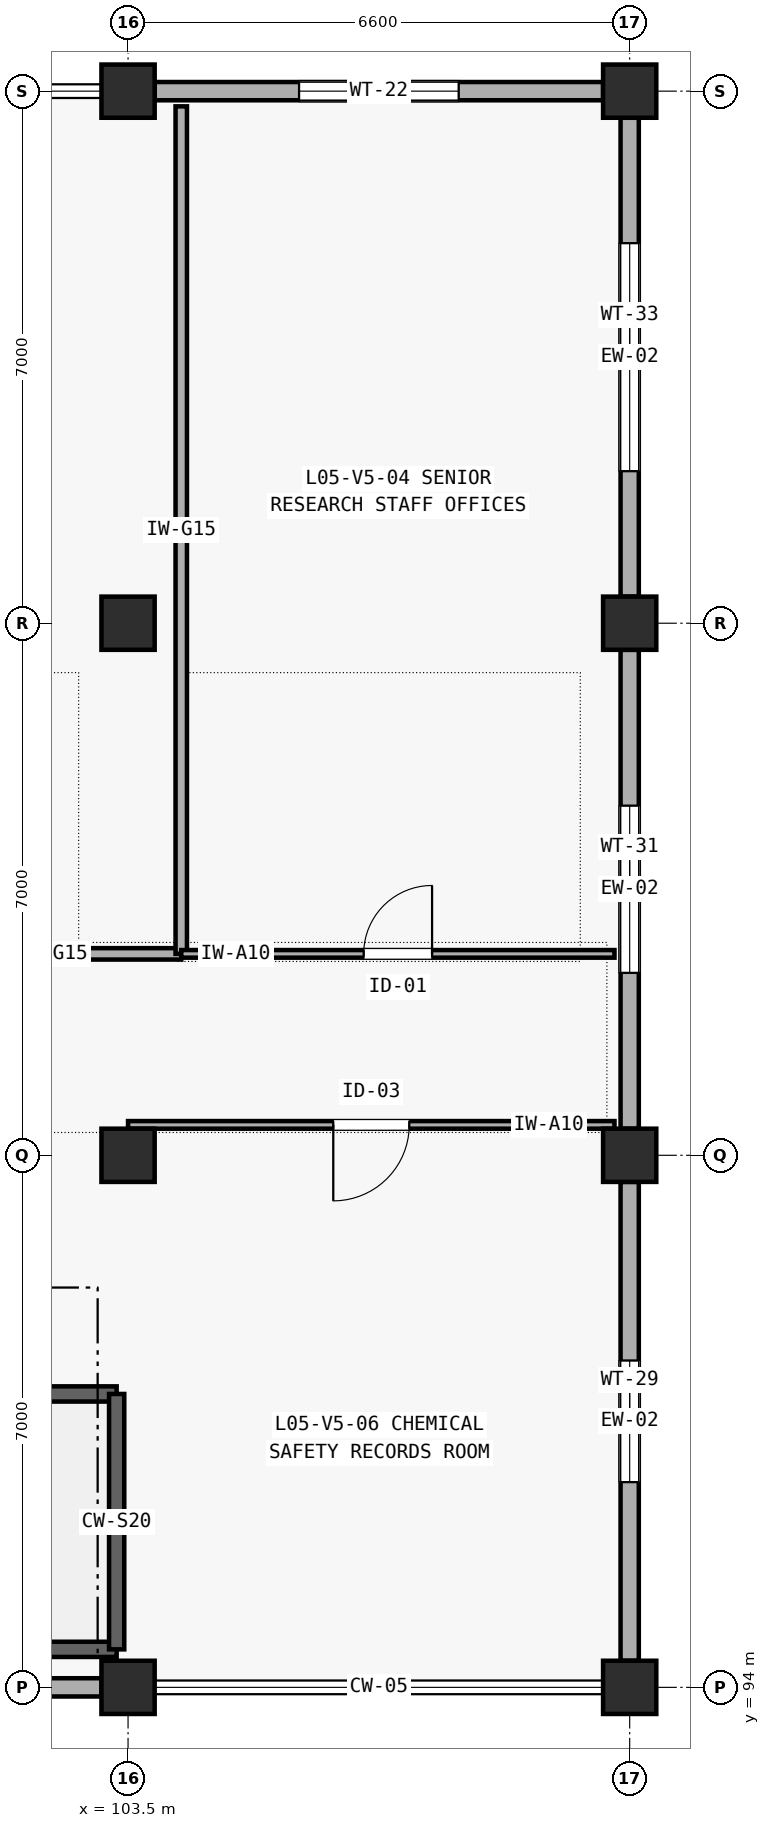
"""IFC4 building model, lengths in metres.
Left out: names, types, materials, properties, quantities, classifications, styles, units other than length and angle.
Written with IfcOpenShell. Run it as: python <this file> out.ifc"""

import sys

from ifc_helpers import new_model, si_unit, direction, frame, frame_2d, origin, origin_2d, place, context, subcontext, project, spatial, rectangle, extrude, element, fill, save


model = new_model("IFC4")
c1 = context("Model", 3, precision=1e-05, world=origin(), true_north=direction((0.0, 1.0)))
c2 = subcontext(c1, "Body", "Model", "MODEL_VIEW")
j1 = project(units=[si_unit("LENGTHUNIT", "METRE"), si_unit("PLANEANGLEUNIT", "RADIAN")], contexts=[c1])
p1 = place(None, origin())
s1 = spatial("IfcSite", under=j1, at=p1, CompositionType="ELEMENT")
p2 = place(p1, origin())
s2 = spatial("IfcBuilding", under=s1, at=p2, CompositionType="ELEMENT")
p3 = place(p2, frame((0.0, 0.0, 21.0)))
s3 = spatial("IfcBuildingStorey", under=s2, at=p3, CompositionType="ELEMENT", Elevation=21.0)
for number, where, z_axis, x_axis in (
    (1, (103.5, 94.0, 0.0), (0.0, 0.0, 1.0), (1.0, 0.0, 0.0)),
    (2, (103.5, 101.0, 0.0), (0.0, 0.0, 1.0), (1.0, 0.0, 0.0)),
    (3, (103.5, 108.0, 0.0), (0.0, 0.0, 1.0), (1.0, 0.0, 0.0)),
    (4, (103.5, 115.0, 0.0), (0.0, 0.0, 1.0), (1.0, 0.0, 0.0)),
    (5, (110.1, 94.0, 0.0), (0.0, 0.0, 1.0), (1.0, 0.0, 0.0)),
    (6, (110.1, 101.0, 0.0), (0.0, 0.0, 1.0), (1.0, 0.0, 0.0)),
    (7, (110.1, 108.0, 0.0), (0.0, 0.0, 1.0), (1.0, 0.0, 0.0)),
    (8, (110.1, 115.0, 0.0), (0.0, 0.0, 1.0), (1.0, 0.0, 0.0)),
):
    element("IfcColumn", number, at=place(p3, frame(where, z_axis=z_axis, x_axis=x_axis)), inside=s3, PredefinedType="COLUMN", context=c2, shape_type="SweptSolid", body=[
        extrude(rectangle(XDim=0.7, YDim=0.7, at=origin_2d()), origin(), (0.0, 0.0, 1.0), 4.2),
    ])
p4 = place(p3, frame((97.25, 94.0, 0.0), z_axis=(0.0, 0.0, 1.0), x_axis=(1.0, 0.0, 0.0)))
e9 = element("IfcWall", 9, at=p4, inside=s3, PredefinedType="SOLIDWALL", context=c2, shape_type="SweptSolid", body=[
    extrude(rectangle(XDim=5.9, YDim=0.24, at=frame_2d((2.95, 0.0))), origin(), (0.0, 0.0, 1.0), 3.235),
])
p5 = place(p4, frame((2.05, 0.0, 0.85)))
e10 = element("IfcOpeningElement", 10, at=p5, cuts=e9, PredefinedType="OPENING", context=c2, shape_type="SweptSolid", body=[
    extrude(rectangle(XDim=1.8, YDim=1.5, at=frame_2d((0.9, 0.75))), frame((0.0, 0.13, 0.0), z_axis=(0.0, -1.0, 0.0), x_axis=(1.0, 0.0, 0.0)), (0.0, 0.0, 1.0), 0.26),
])
p6 = place(p3, frame((103.85, 115.0, 0.0), z_axis=(0.0, 0.0, 1.0), x_axis=(1.0, 0.0, 0.0)))
e11 = element("IfcWall", 11, at=p6, inside=s3, PredefinedType="SOLIDWALL", context=c2, shape_type="SweptSolid", body=[
    extrude(rectangle(XDim=5.9, YDim=0.24, at=frame_2d((2.95, 0.0))), origin(), (0.0, 0.0, 1.0), 3.285),
])
p7 = place(p6, frame((1.9, 0.0, 0.85)))
e12 = element("IfcOpeningElement", 12, at=p7, cuts=e11, PredefinedType="OPENING", context=c2, shape_type="SweptSolid", body=[
    extrude(rectangle(XDim=2.1, YDim=1.6, at=frame_2d((1.05, 0.8))), frame((0.0, 0.13, 0.0), z_axis=(0.0, -1.0, 0.0), x_axis=(1.0, 0.0, 0.0)), (0.0, 0.0, 1.0), 0.26),
])
p8 = place(p3, frame((110.1, 94.35, 0.0), z_axis=(0.0, 0.0, 1.0), x_axis=(0.0, 1.0, 0.0)))
e13 = element("IfcWall", 13, at=p8, inside=s3, PredefinedType="SOLIDWALL", context=c2, shape_type="SweptSolid", body=[
    extrude(rectangle(XDim=6.3, YDim=0.24, at=frame_2d((3.15, 0.0))), origin(), (0.0, 0.0, 1.0), 3.465),
])
p9 = place(p8, frame((2.35, 0.0, 0.85)))
e14 = element("IfcOpeningElement", 14, at=p9, cuts=e13, PredefinedType="OPENING", context=c2, shape_type="SweptSolid", body=[
    extrude(rectangle(XDim=1.6, YDim=1.45, at=frame_2d((0.8, 0.725))), frame((0.0, 0.13, 0.0), z_axis=(0.0, -1.0, 0.0), x_axis=(1.0, 0.0, 0.0)), (0.0, 0.0, 1.0), 0.26),
])
p10 = place(p3, frame((110.1, 101.35, 0.0), z_axis=(0.0, 0.0, 1.0), x_axis=(0.0, 1.0, 0.0)))
e15 = element("IfcWall", 15, at=p10, inside=s3, PredefinedType="SOLIDWALL", context=c2, shape_type="SweptSolid", body=[
    extrude(rectangle(XDim=6.3, YDim=0.24, at=frame_2d((3.15, 0.0))), origin(), (0.0, 0.0, 1.0), 3.465),
])
p11 = place(p10, frame((2.05, 0.0, 0.85)))
e16 = element("IfcOpeningElement", 16, at=p11, cuts=e15, PredefinedType="OPENING", context=c2, shape_type="SweptSolid", body=[
    extrude(rectangle(XDim=2.2, YDim=1.2, at=frame_2d((1.1, 0.6))), frame((0.0, 0.13, 0.0), z_axis=(0.0, -1.0, 0.0), x_axis=(1.0, 0.0, 0.0)), (0.0, 0.0, 1.0), 0.26),
])
p12 = place(p3, frame((110.1, 108.35, 0.0), z_axis=(0.0, 0.0, 1.0), x_axis=(0.0, 1.0, 0.0)))
e17 = element("IfcWall", 17, at=p12, inside=s3, PredefinedType="SOLIDWALL", context=c2, shape_type="SweptSolid", body=[
    extrude(rectangle(XDim=6.3, YDim=0.24, at=frame_2d((3.15, 0.0))), origin(), (0.0, 0.0, 1.0), 3.465),
])
p13 = place(p12, frame((1.65, 0.0, 0.85)))
e18 = element("IfcOpeningElement", 18, at=p13, cuts=e17, PredefinedType="OPENING", context=c2, shape_type="SweptSolid", body=[
    extrude(rectangle(XDim=3.0, YDim=1.2, at=frame_2d((1.5, 0.6))), frame((0.0, 0.13, 0.0), z_axis=(0.0, -1.0, 0.0), x_axis=(1.0, 0.0, 0.0)), (0.0, 0.0, 1.0), 0.26),
])
p14 = place(p3, frame((97.05, 94.5, 0.0), z_axis=(0.0, 0.0, 1.0), x_axis=(1.0, 0.0, 0.0)))
e19 = element("IfcWall", 19, at=p14, inside=s3, PredefinedType="SHEAR", context=c2, shape_type="SweptSolid", body=[
    extrude(rectangle(XDim=6.3, YDim=0.2, at=frame_2d((3.15, 0.0))), origin(), (0.0, 0.0, 1.0), 4.2),
])
p15 = place(p3, frame((97.05, 97.86, 0.0), z_axis=(0.0, 0.0, 1.0), x_axis=(1.0, 0.0, 0.0)))
e20 = element("IfcWall", 20, at=p15, inside=s3, PredefinedType="SHEAR", context=c2, shape_type="SweptSolid", body=[
    extrude(rectangle(XDim=6.3, YDim=0.2, at=frame_2d((3.15, 0.0))), origin(), (0.0, 0.0, 1.0), 4.2),
])
p16 = place(p15, frame((0.32, 0.0, 0.0)))
e21 = element("IfcOpeningElement", 21, at=p16, cuts=e20, PredefinedType="OPENING", context=c2, shape_type="SweptSolid", body=[
    extrude(rectangle(XDim=1.2, YDim=2.15, at=frame_2d((0.6, 1.075))), frame((0.0, 0.11, 0.0), z_axis=(0.0, -1.0, 0.0), x_axis=(1.0, 0.0, 0.0)), (0.0, 0.0, 1.0), 0.22),
])
p17 = place(p3, frame((103.35, 94.5, 0.0), z_axis=(0.0, 0.0, 1.0), x_axis=(0.0, 1.0, 0.0)))
e22 = element("IfcWall", 22, at=p17, inside=s3, PredefinedType="SHEAR", context=c2, shape_type="SweptSolid", body=[
    extrude(rectangle(XDim=3.36, YDim=0.2, at=frame_2d((1.68, 0.0))), origin(), (0.0, 0.0, 1.0), 4.2),
])
p18 = place(p3, frame((93.8, 103.65, 0.0), z_axis=(0.0, 0.0, 1.0), x_axis=(1.0, 0.0, 0.0)))
e23 = element("IfcWall", 23, at=p18, inside=s3, PredefinedType="PARTITIONING", context=c2, shape_type="SweptSolid", body=[
    extrude(rectangle(XDim=10.4, YDim=0.15, at=frame_2d((5.2, 0.0))), origin(), (0.0, 0.0, 1.0), 3.9),
])
p19 = place(p18, frame((4.35, 0.0, 0.0)))
e24 = element("IfcOpeningElement", 24, at=p19, cuts=e23, PredefinedType="OPENING", context=c2, shape_type="SweptSolid", body=[
    extrude(rectangle(XDim=1.7, YDim=2.2, at=frame_2d((0.85, 1.1))), frame((0.0, 0.085, 0.0), z_axis=(0.0, -1.0, 0.0), x_axis=(1.0, 0.0, 0.0)), (0.0, 0.0, 1.0), 0.17),
])
p20 = place(p3, frame((104.2, 103.65, 0.0), z_axis=(0.0, 0.0, 1.0), x_axis=(0.0, 1.0, 0.0)))
e25 = element("IfcWall", 25, at=p20, inside=s3, PredefinedType="PARTITIONING", context=c2, shape_type="SweptSolid", body=[
    extrude(rectangle(XDim=11.15, YDim=0.15, at=frame_2d((5.575, 0.0))), origin(), (0.0, 0.0, 1.0), 3.9),
])
p21 = place(p3, frame((104.2, 103.65, 0.0), z_axis=(0.0, 0.0, 1.0), x_axis=(1.0, 0.0, 0.0)))
e26 = element("IfcWall", 26, at=p21, inside=s3, PredefinedType="PARTITIONING", context=c2, shape_type="SweptSolid", body=[
    extrude(rectangle(XDim=5.7, YDim=0.1, at=frame_2d((2.85, 0.0))), origin(), (0.0, 0.0, 1.0), 3.9),
])
p22 = place(p21, frame((2.4, 0.0, 0.0)))
e27 = element("IfcOpeningElement", 27, at=p22, cuts=e26, PredefinedType="OPENING", context=c2, shape_type="SweptSolid", body=[
    extrude(rectangle(XDim=0.9, YDim=2.1, at=frame_2d((0.45, 1.05))), frame((0.0, 0.06, 0.0), z_axis=(0.0, -1.0, 0.0), x_axis=(1.0, 0.0, 0.0)), (0.0, 0.0, 1.0), 0.12),
])
p23 = place(p3, frame((103.5, 101.4, 0.0), z_axis=(0.0, 0.0, 1.0), x_axis=(1.0, 0.0, 0.0)))
e28 = element("IfcWall", 28, at=p23, inside=s3, PredefinedType="PARTITIONING", context=c2, shape_type="SweptSolid", body=[
    extrude(rectangle(XDim=6.4, YDim=0.1, at=frame_2d((3.2, 0.0))), origin(), (0.0, 0.0, 1.0), 3.9),
])
p24 = place(p23, frame((2.7, 0.0, 0.0)))
e29 = element("IfcOpeningElement", 29, at=p24, cuts=e28, PredefinedType="OPENING", context=c2, shape_type="SweptSolid", body=[
    extrude(rectangle(XDim=1.0, YDim=2.1, at=frame_2d((0.5, 1.05))), frame((0.0, 0.06, 0.0), z_axis=(0.0, -1.0, 0.0), x_axis=(1.0, 0.0, 0.0)), (0.0, 0.0, 1.0), 0.12),
])
p25 = place(p7, origin())
e30 = element("IfcWindow", 30, at=p25, inside=s3, PartitioningType="SINGLE_PANEL", PredefinedType="WINDOW", context=c2, shape_type="SweptSolid", body=[
    extrude(rectangle(XDim=2.1, YDim=1.6, at=frame_2d((1.05, 0.8))), frame((0.0, 0.03, 0.0), z_axis=(0.0, -1.0, 0.0), x_axis=(1.0, 0.0, 0.0)), (0.0, 0.0, 1.0), 0.06),
])
fill(e12, e30)
p26 = place(p9, origin())
e31 = element("IfcWindow", 31, at=p26, inside=s3, PartitioningType="SINGLE_PANEL", PredefinedType="WINDOW", context=c2, shape_type="SweptSolid", body=[
    extrude(rectangle(XDim=1.6, YDim=1.45, at=frame_2d((0.8, 0.725))), frame((0.0, 0.03, 0.0), z_axis=(0.0, -1.0, 0.0), x_axis=(1.0, 0.0, 0.0)), (0.0, 0.0, 1.0), 0.06),
])
fill(e14, e31)
p27 = place(p11, origin())
e32 = element("IfcWindow", 32, at=p27, inside=s3, PartitioningType="SINGLE_PANEL", PredefinedType="WINDOW", context=c2, shape_type="SweptSolid", body=[
    extrude(rectangle(XDim=2.2, YDim=1.2, at=frame_2d((1.1, 0.6))), frame((0.0, 0.03, 0.0), z_axis=(0.0, -1.0, 0.0), x_axis=(1.0, 0.0, 0.0)), (0.0, 0.0, 1.0), 0.06),
])
fill(e16, e32)
p28 = place(p13, origin())
e33 = element("IfcWindow", 33, at=p28, inside=s3, PartitioningType="SINGLE_PANEL", PredefinedType="WINDOW", context=c2, shape_type="SweptSolid", body=[
    extrude(rectangle(XDim=3.0, YDim=1.2, at=frame_2d((1.5, 0.6))), frame((0.0, 0.03, 0.0), z_axis=(0.0, -1.0, 0.0), x_axis=(1.0, 0.0, 0.0)), (0.0, 0.0, 1.0), 0.06),
])
fill(e18, e33)
p29 = place(p22, origin())
e34 = element("IfcDoor", 34, at=p29, inside=s3, OperationType="SINGLE_SWING_RIGHT", PredefinedType="DOOR", context=c2, shape_type="SweptSolid", body=[
    extrude(rectangle(XDim=0.9, YDim=2.1, at=frame_2d((0.45, 1.05))), frame((0.0, 0.025, 0.0), z_axis=(0.0, -1.0, 0.0), x_axis=(1.0, 0.0, 0.0)), (0.0, 0.0, 1.0), 0.05),
])
fill(e27, e34)
p30 = place(p24, frame((1.0, 0.0, 0.0), z_axis=(0.0, 0.0, 1.0), x_axis=(-1.0, 0.0, 0.0)))
e35 = element("IfcDoor", 35, at=p30, inside=s3, OperationType="SINGLE_SWING_RIGHT", PredefinedType="DOOR", context=c2, shape_type="SweptSolid", body=[
    extrude(rectangle(XDim=1.0, YDim=2.1, at=frame_2d((0.5, 1.05))), frame((0.0, 0.025, 0.0), z_axis=(0.0, -1.0, 0.0), x_axis=(1.0, 0.0, 0.0)), (0.0, 0.0, 1.0), 0.05),
])
fill(e29, e35)
save(model, sys.argv[1])
